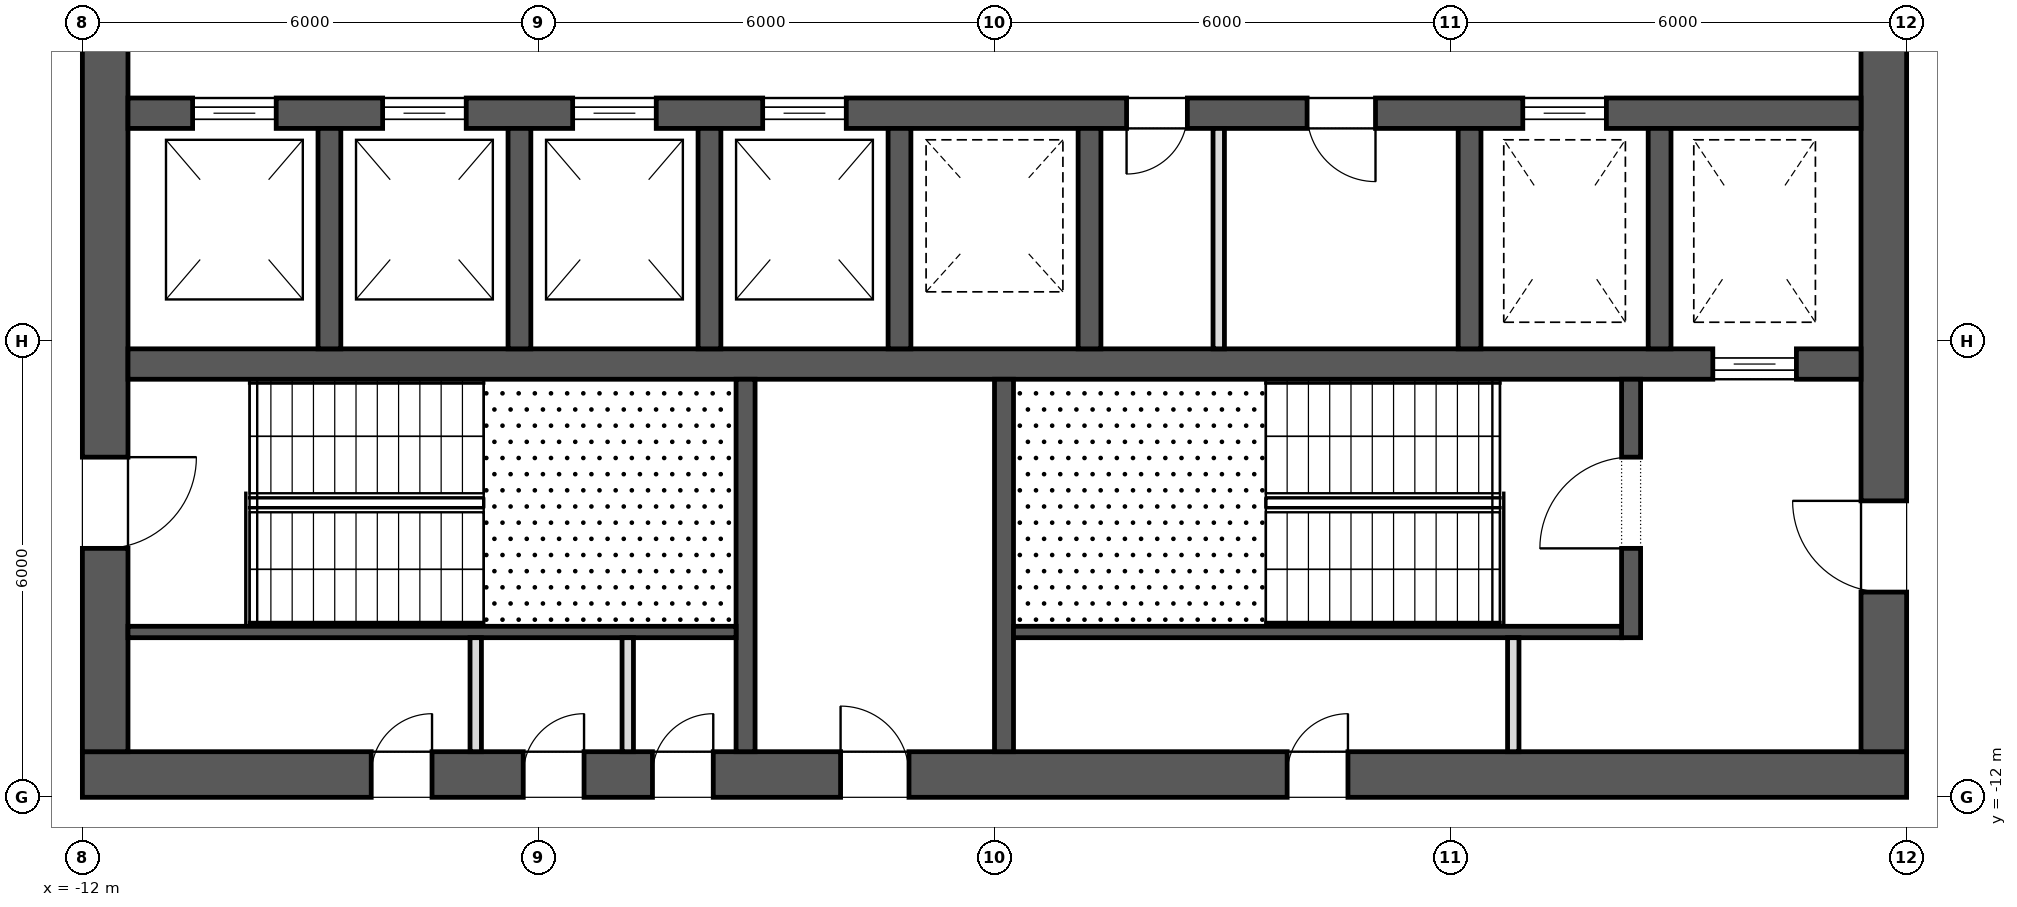
"""IFC4 building model, lengths in metres.
Left out: names, types, materials, properties, quantities, classifications, styles, units other than length and angle.
Written with IfcOpenShell. Run it as: python <this file> out.ifc"""

import sys

from ifc_helpers import new_model, si_unit, direction, frame, frame_2d, origin, place, context, subcontext, project, spatial, rectangle, extrude, element, fill, save


model = new_model("IFC4")
c1 = context("Model", 3, precision=1e-05, world=origin(), true_north=direction((0.0, 1.0)))
c2 = subcontext(c1, "Body", "Model", "MODEL_VIEW")
j1 = project(units=[si_unit("LENGTHUNIT", "METRE"), si_unit("PLANEANGLEUNIT", "RADIAN")], contexts=[c1])
p1 = place(None, origin())
s1 = spatial("IfcSite", under=j1, at=p1, CompositionType="ELEMENT")
p2 = place(p1, origin())
s2 = spatial("IfcBuilding", under=s1, at=p2, CompositionType="ELEMENT")
p3 = place(p2, frame((0.0, 0.0, 234.9)))
s3 = spatial("IfcBuildingStorey", under=s2, at=p3, CompositionType="ELEMENT", Elevation=234.9)
p4 = place(p3, frame((-12.0, -11.7, 0.0), z_axis=(0.0, 0.0, 1.0), x_axis=(1.0, 0.0, 0.0)))
e1 = element("IfcWall", 1, at=p4, inside=s3, PredefinedType="SHEAR", context=c2, shape_type="SweptSolid", body=[
    extrude(rectangle(XDim=24.0, YDim=0.6, at=frame_2d((12.0, 0.0))), origin(), (0.0, 0.0, 1.0), 4.0),
])
p5 = place(p4, frame((9.975, 0.0, 0.0)))
e2 = element("IfcOpeningElement", 2, at=p5, cuts=e1, PredefinedType="OPENING", context=c2, shape_type="SweptSolid", body=[
    extrude(rectangle(XDim=0.9, YDim=2.1, at=frame_2d((0.45, 1.05))), frame((0.0, 0.312, 0.0), z_axis=(0.0, -1.0, 0.0), x_axis=(1.0, 0.0, 0.0)), (0.0, 0.0, 1.0), 0.624),
])
p6 = place(p4, frame((3.8, 0.0, 0.0)))
e3 = element("IfcOpeningElement", 3, at=p6, cuts=e1, PredefinedType="OPENING", context=c2, shape_type="SweptSolid", body=[
    extrude(rectangle(XDim=0.8, YDim=2.1, at=frame_2d((0.4, 1.05))), frame((0.0, 0.312, 0.0), z_axis=(0.0, -1.0, 0.0), x_axis=(1.0, 0.0, 0.0)), (0.0, 0.0, 1.0), 0.624),
])
p7 = place(p4, frame((5.8, 0.0, 0.0)))
e4 = element("IfcOpeningElement", 4, at=p7, cuts=e1, PredefinedType="OPENING", context=c2, shape_type="SweptSolid", body=[
    extrude(rectangle(XDim=0.8, YDim=2.1, at=frame_2d((0.4, 1.05))), frame((0.0, 0.312, 0.0), z_axis=(0.0, -1.0, 0.0), x_axis=(1.0, 0.0, 0.0)), (0.0, 0.0, 1.0), 0.624),
])
p8 = place(p4, frame((7.5, 0.0, 0.0)))
e5 = element("IfcOpeningElement", 5, at=p8, cuts=e1, PredefinedType="OPENING", context=c2, shape_type="SweptSolid", body=[
    extrude(rectangle(XDim=0.8, YDim=2.1, at=frame_2d((0.4, 1.05))), frame((0.0, 0.312, 0.0), z_axis=(0.0, -1.0, 0.0), x_axis=(1.0, 0.0, 0.0)), (0.0, 0.0, 1.0), 0.624),
])
p9 = place(p4, frame((15.85, 0.0, 0.0)))
e6 = element("IfcOpeningElement", 6, at=p9, cuts=e1, PredefinedType="OPENING", context=c2, shape_type="SweptSolid", body=[
    extrude(rectangle(XDim=0.8, YDim=2.1, at=frame_2d((0.4, 1.05))), frame((0.0, 0.312, 0.0), z_axis=(0.0, -1.0, 0.0), x_axis=(1.0, 0.0, 0.0)), (0.0, 0.0, 1.0), 0.624),
])
p10 = place(p3, frame((11.7, -11.4, 0.0), z_axis=(0.0, 0.0, 1.0), x_axis=(0.0, 1.0, 0.0)))
e7 = element("IfcWall", 7, at=p10, inside=s3, PredefinedType="SHEAR", context=c2, shape_type="SweptSolid", body=[
    extrude(rectangle(XDim=22.8, YDim=0.6, at=frame_2d((11.4, 0.0))), origin(), (0.0, 0.0, 1.0), 4.0),
])
p11 = place(p10, frame((10.2, 0.0, 0.0)))
e8 = element("IfcOpeningElement", 8, at=p11, cuts=e7, PredefinedType="OPENING", context=c2, shape_type="SweptSolid", body=[
    extrude(rectangle(XDim=2.4, YDim=2.1, at=frame_2d((1.2, 1.05))), frame((0.0, 0.312, 0.0), z_axis=(0.0, -1.0, 0.0), x_axis=(1.0, 0.0, 0.0)), (0.0, 0.0, 1.0), 0.624),
])
p12 = place(p10, frame((19.5, 0.0, 0.0)))
e9 = element("IfcOpeningElement", 9, at=p12, cuts=e7, PredefinedType="OPENING", context=c2, shape_type="SweptSolid", body=[
    extrude(rectangle(XDim=1.2, YDim=2.1, at=frame_2d((0.6, 1.05))), frame((0.0, 0.312, 0.0), z_axis=(0.0, -1.0, 0.0), x_axis=(1.0, 0.0, 0.0)), (0.0, 0.0, 1.0), 0.624),
])
p13 = place(p10, frame((2.1, 0.0, 0.0)))
e10 = element("IfcOpeningElement", 10, at=p13, cuts=e7, PredefinedType="OPENING", context=c2, shape_type="SweptSolid", body=[
    extrude(rectangle(XDim=1.2, YDim=2.1, at=frame_2d((0.6, 1.05))), frame((0.0, 0.312, 0.0), z_axis=(0.0, -1.0, 0.0), x_axis=(1.0, 0.0, 0.0)), (0.0, 0.0, 1.0), 0.624),
])
p14 = place(p3, frame((-11.7, -11.4, 0.0), z_axis=(0.0, 0.0, 1.0), x_axis=(0.0, 1.0, 0.0)))
e11 = element("IfcWall", 11, at=p14, inside=s3, PredefinedType="SHEAR", context=c2, shape_type="SweptSolid", body=[
    extrude(rectangle(XDim=22.8, YDim=0.6, at=frame_2d((11.4, 0.0))), origin(), (0.0, 0.0, 1.0), 4.0),
])
p15 = place(p14, frame((10.2, 0.0, 0.0)))
e12 = element("IfcOpeningElement", 12, at=p15, cuts=e11, PredefinedType="OPENING", context=c2, shape_type="SweptSolid", body=[
    extrude(rectangle(XDim=2.4, YDim=2.1, at=frame_2d((1.2, 1.05))), frame((0.0, 0.312, 0.0), z_axis=(0.0, -1.0, 0.0), x_axis=(1.0, 0.0, 0.0)), (0.0, 0.0, 1.0), 0.624),
])
p16 = place(p14, frame((18.925, 0.0, 0.0)))
e13 = element("IfcOpeningElement", 13, at=p16, cuts=e11, PredefinedType="OPENING", context=c2, shape_type="SweptSolid", body=[
    extrude(rectangle(XDim=1.2, YDim=2.1, at=frame_2d((0.6, 1.05))), frame((0.0, 0.312, 0.0), z_axis=(0.0, -1.0, 0.0), x_axis=(1.0, 0.0, 0.0)), (0.0, 0.0, 1.0), 0.624),
])
p17 = place(p14, frame((2.675, 0.0, 0.0)))
e14 = element("IfcOpeningElement", 14, at=p17, cuts=e11, PredefinedType="OPENING", context=c2, shape_type="SweptSolid", body=[
    extrude(rectangle(XDim=1.2, YDim=2.1, at=frame_2d((0.6, 1.05))), frame((0.0, 0.312, 0.0), z_axis=(0.0, -1.0, 0.0), x_axis=(1.0, 0.0, 0.0)), (0.0, 0.0, 1.0), 0.624),
])
p18 = place(p3, frame((-11.4, -3.0, 0.0), z_axis=(0.0, 0.0, 1.0), x_axis=(1.0, 0.0, 0.0)))
e15 = element("IfcWall", 15, at=p18, inside=s3, PredefinedType="SHEAR", context=c2, shape_type="SweptSolid", body=[
    extrude(rectangle(XDim=22.8, YDim=0.4, at=frame_2d((11.4, 0.0))), origin(), (0.0, 0.0, 1.0), 4.0),
])
p19 = place(p18, frame((0.85, 0.0, 0.0)))
e16 = element("IfcOpeningElement", 16, at=p19, cuts=e15, PredefinedType="OPENING", context=c2, shape_type="SweptSolid", body=[
    extrude(rectangle(XDim=1.1, YDim=2.1, at=frame_2d((0.55, 1.05))), frame((0.0, 0.212, 0.0), z_axis=(0.0, -1.0, 0.0), x_axis=(1.0, 0.0, 0.0)), (0.0, 0.0, 1.0), 0.424),
])
p20 = place(p18, frame((3.35, 0.0, 0.0)))
e17 = element("IfcOpeningElement", 17, at=p20, cuts=e15, PredefinedType="OPENING", context=c2, shape_type="SweptSolid", body=[
    extrude(rectangle(XDim=1.1, YDim=2.1, at=frame_2d((0.55, 1.05))), frame((0.0, 0.212, 0.0), z_axis=(0.0, -1.0, 0.0), x_axis=(1.0, 0.0, 0.0)), (0.0, 0.0, 1.0), 0.424),
])
p21 = place(p18, frame((5.85, 0.0, 0.0)))
e18 = element("IfcOpeningElement", 18, at=p21, cuts=e15, PredefinedType="OPENING", context=c2, shape_type="SweptSolid", body=[
    extrude(rectangle(XDim=1.1, YDim=2.1, at=frame_2d((0.55, 1.05))), frame((0.0, 0.212, 0.0), z_axis=(0.0, -1.0, 0.0), x_axis=(1.0, 0.0, 0.0)), (0.0, 0.0, 1.0), 0.424),
])
p22 = place(p18, frame((8.35, 0.0, 0.0)))
e19 = element("IfcOpeningElement", 19, at=p22, cuts=e15, PredefinedType="OPENING", context=c2, shape_type="SweptSolid", body=[
    extrude(rectangle(XDim=1.1, YDim=2.1, at=frame_2d((0.55, 1.05))), frame((0.0, 0.212, 0.0), z_axis=(0.0, -1.0, 0.0), x_axis=(1.0, 0.0, 0.0)), (0.0, 0.0, 1.0), 0.424),
])
p23 = place(p18, frame((18.35, 0.0, 0.0)))
e20 = element("IfcOpeningElement", 20, at=p23, cuts=e15, PredefinedType="OPENING", context=c2, shape_type="SweptSolid", body=[
    extrude(rectangle(XDim=1.1, YDim=2.1, at=frame_2d((0.55, 1.05))), frame((0.0, 0.212, 0.0), z_axis=(0.0, -1.0, 0.0), x_axis=(1.0, 0.0, 0.0)), (0.0, 0.0, 1.0), 0.424),
])
p24 = place(p18, frame((13.137, 0.0, 0.0)))
e21 = element("IfcOpeningElement", 21, at=p24, cuts=e15, PredefinedType="OPENING", context=c2, shape_type="SweptSolid", body=[
    extrude(rectangle(XDim=0.8, YDim=2.1, at=frame_2d((0.4, 1.05))), frame((0.0, 0.212, 0.0), z_axis=(0.0, -1.0, 0.0), x_axis=(1.0, 0.0, 0.0)), (0.0, 0.0, 1.0), 0.424),
])
p25 = place(p18, frame((15.512, 0.0, 0.0)))
e22 = element("IfcOpeningElement", 22, at=p25, cuts=e15, PredefinedType="OPENING", context=c2, shape_type="SweptSolid", body=[
    extrude(rectangle(XDim=0.9, YDim=2.1, at=frame_2d((0.45, 1.05))), frame((0.0, 0.212, 0.0), z_axis=(0.0, -1.0, 0.0), x_axis=(1.0, 0.0, 0.0)), (0.0, 0.0, 1.0), 0.424),
])
p26 = place(p3, frame((-11.4, -6.3, 0.0), z_axis=(0.0, 0.0, 1.0), x_axis=(1.0, 0.0, 0.0)))
e23 = element("IfcWall", 23, at=p26, inside=s3, PredefinedType="SHEAR", context=c2, shape_type="SweptSolid", body=[
    extrude(rectangle(XDim=22.8, YDim=0.4, at=frame_2d((11.4, 0.0))), origin(), (0.0, 0.0, 1.0), 4.0),
])
p27 = place(p26, frame((20.85, 0.0, 0.0)))
e24 = element("IfcOpeningElement", 24, at=p27, cuts=e23, PredefinedType="OPENING", context=c2, shape_type="SweptSolid", body=[
    extrude(rectangle(XDim=1.1, YDim=2.1, at=frame_2d((0.55, 1.05))), frame((0.0, 0.212, 0.0), z_axis=(0.0, -1.0, 0.0), x_axis=(1.0, 0.0, 0.0)), (0.0, 0.0, 1.0), 0.424),
])
for number, where, z_axis, x_axis in (
    (25, (-8.75, -6.1, 0.0), (0.0, 0.0, 1.0), (0.0, 1.0, 0.0)),
    (26, (-6.25, -6.1, 0.0), (0.0, 0.0, 1.0), (0.0, 1.0, 0.0)),
    (27, (-3.75, -6.1, 0.0), (0.0, 0.0, 1.0), (0.0, 1.0, 0.0)),
    (28, (-1.25, -6.1, 0.0), (0.0, 0.0, 1.0), (0.0, 1.0, 0.0)),
    (29, (1.25, -6.1, 0.0), (0.0, 0.0, 1.0), (0.0, 1.0, 0.0)),
    (30, (6.25, -6.1, 0.0), (0.0, 0.0, 1.0), (0.0, 1.0, 0.0)),
    (31, (8.75, -6.1, 0.0), (0.0, 0.0, 1.0), (0.0, 1.0, 0.0)),
):
    element("IfcWall", number, at=place(p3, frame(where, z_axis=z_axis, x_axis=x_axis)), inside=s3, PredefinedType="SHEAR", context=c2, shape_type="SweptSolid", body=[
        extrude(rectangle(XDim=2.9, YDim=0.3, at=frame_2d((1.45, 0.0))), origin(), (0.0, 0.0, 1.0), 4.0),
    ])
for number, where, z_axis, x_axis in (
    (32, (-3.275, -11.4, 0.0), (0.0, 0.0, 1.0), (0.0, 1.0, 0.0)),
    (33, (0.125, -11.4, 0.0), (0.0, 0.0, 1.0), (0.0, 1.0, 0.0)),
):
    element("IfcWall", number, at=place(p3, frame(where, z_axis=z_axis, x_axis=x_axis)), inside=s3, PredefinedType="SHEAR", context=c2, shape_type="SweptSolid", body=[
        extrude(rectangle(XDim=4.9, YDim=0.25, at=frame_2d((2.45, 0.0))), origin(), (0.0, 0.0, 1.0), 3.7),
    ])
p28 = place(p3, frame((8.375, -9.9, 0.0), z_axis=(0.0, 0.0, 1.0), x_axis=(0.0, 1.0, 0.0)))
e34 = element("IfcWall", 34, at=p28, inside=s3, PredefinedType="SHEAR", context=c2, shape_type="SweptSolid", body=[
    extrude(rectangle(XDim=3.4, YDim=0.25, at=frame_2d((1.7, 0.0))), origin(), (0.0, 0.0, 1.0), 3.7),
])
p29 = place(p28, frame((1.175, 0.0, 0.0)))
e35 = element("IfcOpeningElement", 35, at=p29, cuts=e34, PredefinedType="OPENING", context=c2, shape_type="SweptSolid", body=[
    extrude(rectangle(XDim=1.2, YDim=2.1, at=frame_2d((0.6, 1.05))), frame((0.0, 0.137, 0.0), z_axis=(0.0, -1.0, 0.0), x_axis=(1.0, 0.0, 0.0)), (0.0, 0.0, 1.0), 0.274),
])
for number, where, z_axis, x_axis in (
    (36, (-11.4, -9.825, 0.0), (0.0, 0.0, 1.0), (1.0, 0.0, 0.0)),
    (37, (0.25, -9.825, 0.0), (0.0, 0.0, 1.0), (1.0, 0.0, 0.0)),
):
    element("IfcWall", number, at=place(p3, frame(where, z_axis=z_axis, x_axis=x_axis)), inside=s3, PredefinedType="SHEAR", context=c2, shape_type="SweptSolid", body=[
        extrude(rectangle(XDim=8.0, YDim=0.15, at=frame_2d((4.0, 0.0))), origin(), (0.0, 0.0, 1.0), 3.7),
    ])
for number, where, z_axis, x_axis in (
    (38, (-6.825, -11.4, 0.0), (0.0, 0.0, 1.0), (0.0, 1.0, 0.0)),
    (39, (-4.825, -11.4, 0.0), (0.0, 0.0, 1.0), (0.0, 1.0, 0.0)),
    (40, (6.825, -11.4, 0.0), (0.0, 0.0, 1.0), (0.0, 1.0, 0.0)),
):
    element("IfcWall", number, at=place(p3, frame(where, z_axis=z_axis, x_axis=x_axis)), inside=s3, PredefinedType="PARTITIONING", context=c2, shape_type="SweptSolid", body=[
        extrude(rectangle(XDim=1.5, YDim=0.15, at=frame_2d((0.75, 0.0))), origin(), (0.0, 0.0, 1.0), 3.7),
    ])
p30 = place(p3, frame((2.95, -6.1, 0.0), z_axis=(0.0, 0.0, 1.0), x_axis=(0.0, 1.0, 0.0)))
e41 = element("IfcWall", 41, at=p30, inside=s3, PredefinedType="PARTITIONING", context=c2, shape_type="SweptSolid", body=[
    extrude(rectangle(XDim=2.9, YDim=0.15, at=frame_2d((1.45, 0.0))), origin(), (0.0, 0.0, 1.0), 3.7),
])
p31 = place(p27, origin())
e42 = element("IfcDoor", 42, at=p31, inside=s3, OperationType="SLIDING_TO_LEFT", PredefinedType="DOOR", context=c2, shape_type="SweptSolid", body=[
    extrude(rectangle(XDim=1.1, YDim=2.1, at=frame_2d((0.55, 1.05))), frame((0.0, 0.025, 0.0), z_axis=(0.0, -1.0, 0.0), x_axis=(1.0, 0.0, 0.0)), (0.0, 0.0, 1.0), 0.05),
])
fill(e24, e42)
p32 = place(p19, origin())
e43 = element("IfcDoor", 43, at=p32, inside=s3, OperationType="SLIDING_TO_LEFT", PredefinedType="DOOR", context=c2, shape_type="SweptSolid", body=[
    extrude(rectangle(XDim=1.1, YDim=2.1, at=frame_2d((0.55, 1.05))), frame((0.0, 0.025, 0.0), z_axis=(0.0, -1.0, 0.0), x_axis=(1.0, 0.0, 0.0)), (0.0, 0.0, 1.0), 0.05),
])
fill(e16, e43)
p33 = place(p20, origin())
e44 = element("IfcDoor", 44, at=p33, inside=s3, OperationType="SLIDING_TO_LEFT", PredefinedType="DOOR", context=c2, shape_type="SweptSolid", body=[
    extrude(rectangle(XDim=1.1, YDim=2.1, at=frame_2d((0.55, 1.05))), frame((0.0, 0.025, 0.0), z_axis=(0.0, -1.0, 0.0), x_axis=(1.0, 0.0, 0.0)), (0.0, 0.0, 1.0), 0.05),
])
fill(e17, e44)
p34 = place(p21, origin())
e45 = element("IfcDoor", 45, at=p34, inside=s3, OperationType="SLIDING_TO_LEFT", PredefinedType="DOOR", context=c2, shape_type="SweptSolid", body=[
    extrude(rectangle(XDim=1.1, YDim=2.1, at=frame_2d((0.55, 1.05))), frame((0.0, 0.025, 0.0), z_axis=(0.0, -1.0, 0.0), x_axis=(1.0, 0.0, 0.0)), (0.0, 0.0, 1.0), 0.05),
])
fill(e18, e45)
p35 = place(p22, origin())
e46 = element("IfcDoor", 46, at=p35, inside=s3, OperationType="SLIDING_TO_LEFT", PredefinedType="DOOR", context=c2, shape_type="SweptSolid", body=[
    extrude(rectangle(XDim=1.1, YDim=2.1, at=frame_2d((0.55, 1.05))), frame((0.0, 0.025, 0.0), z_axis=(0.0, -1.0, 0.0), x_axis=(1.0, 0.0, 0.0)), (0.0, 0.0, 1.0), 0.05),
])
fill(e19, e46)
p36 = place(p23, origin())
e47 = element("IfcDoor", 47, at=p36, inside=s3, OperationType="SLIDING_TO_LEFT", PredefinedType="DOOR", context=c2, shape_type="SweptSolid", body=[
    extrude(rectangle(XDim=1.1, YDim=2.1, at=frame_2d((0.55, 1.05))), frame((0.0, 0.025, 0.0), z_axis=(0.0, -1.0, 0.0), x_axis=(1.0, 0.0, 0.0)), (0.0, 0.0, 1.0), 0.05),
])
fill(e20, e47)
p37 = place(p17, frame((1.2, 0.0, 0.0), z_axis=(0.0, 0.0, 1.0), x_axis=(-1.0, 0.0, 0.0)))
e48 = element("IfcDoor", 48, at=p37, inside=s3, OperationType="SINGLE_SWING_RIGHT", PredefinedType="DOOR", context=c2, shape_type="SweptSolid", body=[
    extrude(rectangle(XDim=1.2, YDim=2.1, at=frame_2d((0.6, 1.05))), frame((0.0, 0.025, 0.0), z_axis=(0.0, -1.0, 0.0), x_axis=(1.0, 0.0, 0.0)), (0.0, 0.0, 1.0), 0.05),
])
fill(e14, e48)
p38 = place(p29, origin())
e49 = element("IfcDoor", 49, at=p38, inside=s3, OperationType="SINGLE_SWING_RIGHT", PredefinedType="DOOR", context=c2, shape_type="SweptSolid", body=[
    extrude(rectangle(XDim=1.2, YDim=2.1, at=frame_2d((0.6, 1.05))), frame((0.0, 0.025, 0.0), z_axis=(0.0, -1.0, 0.0), x_axis=(1.0, 0.0, 0.0)), (0.0, 0.0, 1.0), 0.05),
])
fill(e35, e49)
p39 = place(p13, origin())
e50 = element("IfcDoor", 50, at=p39, inside=s3, OperationType="SINGLE_SWING_LEFT", PredefinedType="DOOR", context=c2, shape_type="SweptSolid", body=[
    extrude(rectangle(XDim=1.2, YDim=2.1, at=frame_2d((0.6, 1.05))), frame((0.0, 0.025, 0.0), z_axis=(0.0, -1.0, 0.0), x_axis=(1.0, 0.0, 0.0)), (0.0, 0.0, 1.0), 0.05),
])
fill(e10, e50)
p40 = place(p5, origin())
e51 = element("IfcDoor", 51, at=p40, inside=s3, OperationType="SINGLE_SWING_RIGHT", PredefinedType="DOOR", context=c2, shape_type="SweptSolid", body=[
    extrude(rectangle(XDim=0.9, YDim=2.1, at=frame_2d((0.45, 1.05))), frame((0.0, 0.025, 0.0), z_axis=(0.0, -1.0, 0.0), x_axis=(1.0, 0.0, 0.0)), (0.0, 0.0, 1.0), 0.05),
])
fill(e2, e51)
p41 = place(p6, origin())
e52 = element("IfcDoor", 52, at=p41, inside=s3, OperationType="SINGLE_SWING_LEFT", PredefinedType="DOOR", context=c2, shape_type="SweptSolid", body=[
    extrude(rectangle(XDim=0.8, YDim=2.1, at=frame_2d((0.4, 1.05))), frame((0.0, 0.025, 0.0), z_axis=(0.0, -1.0, 0.0), x_axis=(1.0, 0.0, 0.0)), (0.0, 0.0, 1.0), 0.05),
])
fill(e3, e52)
p42 = place(p7, origin())
e53 = element("IfcDoor", 53, at=p42, inside=s3, OperationType="SINGLE_SWING_LEFT", PredefinedType="DOOR", context=c2, shape_type="SweptSolid", body=[
    extrude(rectangle(XDim=0.8, YDim=2.1, at=frame_2d((0.4, 1.05))), frame((0.0, 0.025, 0.0), z_axis=(0.0, -1.0, 0.0), x_axis=(1.0, 0.0, 0.0)), (0.0, 0.0, 1.0), 0.05),
])
fill(e4, e53)
p43 = place(p8, origin())
e54 = element("IfcDoor", 54, at=p43, inside=s3, OperationType="SINGLE_SWING_LEFT", PredefinedType="DOOR", context=c2, shape_type="SweptSolid", body=[
    extrude(rectangle(XDim=0.8, YDim=2.1, at=frame_2d((0.4, 1.05))), frame((0.0, 0.025, 0.0), z_axis=(0.0, -1.0, 0.0), x_axis=(1.0, 0.0, 0.0)), (0.0, 0.0, 1.0), 0.05),
])
fill(e5, e54)
p44 = place(p9, origin())
e55 = element("IfcDoor", 55, at=p44, inside=s3, OperationType="SINGLE_SWING_LEFT", PredefinedType="DOOR", context=c2, shape_type="SweptSolid", body=[
    extrude(rectangle(XDim=0.8, YDim=2.1, at=frame_2d((0.4, 1.05))), frame((0.0, 0.025, 0.0), z_axis=(0.0, -1.0, 0.0), x_axis=(1.0, 0.0, 0.0)), (0.0, 0.0, 1.0), 0.05),
])
fill(e6, e55)
p45 = place(p24, frame((0.8, 0.0, 0.0), z_axis=(0.0, 0.0, 1.0), x_axis=(-1.0, 0.0, 0.0)))
e56 = element("IfcDoor", 56, at=p45, inside=s3, OperationType="SINGLE_SWING_LEFT", PredefinedType="DOOR", context=c2, shape_type="SweptSolid", body=[
    extrude(rectangle(XDim=0.8, YDim=2.1, at=frame_2d((0.4, 1.05))), frame((0.0, 0.025, 0.0), z_axis=(0.0, -1.0, 0.0), x_axis=(1.0, 0.0, 0.0)), (0.0, 0.0, 1.0), 0.05),
])
fill(e21, e56)
p46 = place(p25, frame((0.9, 0.0, 0.0), z_axis=(0.0, 0.0, 1.0), x_axis=(-1.0, 0.0, 0.0)))
e57 = element("IfcDoor", 57, at=p46, inside=s3, OperationType="SINGLE_SWING_RIGHT", PredefinedType="DOOR", context=c2, shape_type="SweptSolid", body=[
    extrude(rectangle(XDim=0.9, YDim=2.1, at=frame_2d((0.45, 1.05))), frame((0.0, 0.025, 0.0), z_axis=(0.0, -1.0, 0.0), x_axis=(1.0, 0.0, 0.0)), (0.0, 0.0, 1.0), 0.05),
])
fill(e22, e57)
save(model, sys.argv[1])
